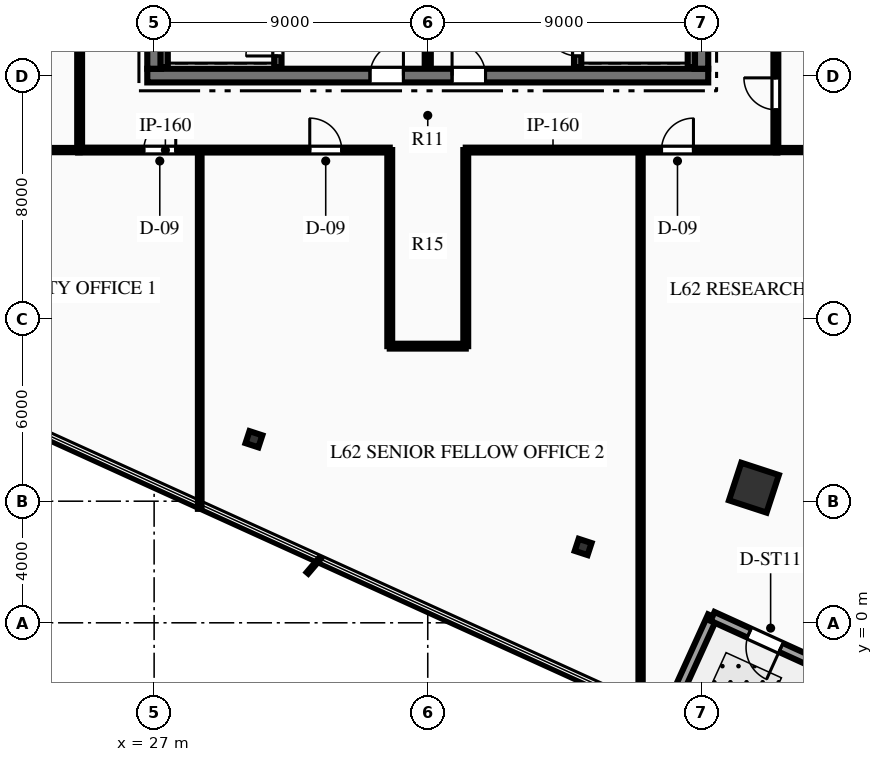
"""IFC4 building model, lengths in metres.
Left out: names, types, materials, properties, quantities, classifications, styles, units other than length and angle.
Written with IfcOpenShell. Run it as: python <this file> out.ifc"""

import sys

from ifc_helpers import new_model, si_unit, direction, frame, frame_2d, origin, origin_2d, place, context, subcontext, project, spatial, rectangle, hollow_rectangle, i_section, extrude, element, fill, save


model = new_model("IFC4")
c1 = context("Model", 3, precision=1e-05, world=origin(), true_north=direction((0.0, 1.0)))
c2 = subcontext(c1, "Body", "Model", "MODEL_VIEW")
j1 = project(units=[si_unit("LENGTHUNIT", "METRE"), si_unit("PLANEANGLEUNIT", "RADIAN")], contexts=[c1])
p1 = place(None, origin())
s1 = spatial("IfcSite", under=j1, at=p1, CompositionType="ELEMENT")
p2 = place(p1, origin())
s2 = spatial("IfcBuilding", under=s1, at=p2, CompositionType="ELEMENT")
p3 = place(p2, frame((0.0, 0.0, 248.7)))
s3 = spatial("IfcBuildingStorey", under=s2, at=p3, CompositionType="ELEMENT", Elevation=248.7)
p4 = place(p3, frame((26.775, 18.0, 0.0), z_axis=(0.0, 0.0, 1.0), x_axis=(1.0, 0.0, 0.0)))
e1 = element("IfcWall", 1, at=p4, inside=s3, PredefinedType="SHEAR", context=c2, shape_type="SweptSolid", body=[
    extrude(rectangle(XDim=18.45, YDim=0.45, at=frame_2d((9.225, 0.0))), origin(), (0.0, 0.0, 1.0), 3.75),
])
p5 = place(p4, frame((7.325, 0.0, 0.0)))
e2 = element("IfcOpeningElement", 2, at=p5, cuts=e1, PredefinedType="OPENING", context=c2, shape_type="SweptSolid", body=[
    extrude(rectangle(XDim=1.1, YDim=2.15, at=frame_2d((0.55, 1.075))), frame((0.0, 0.235, 0.0), z_axis=(0.0, -1.0, 0.0), x_axis=(1.0, 0.0, 0.0)), (0.0, 0.0, 1.0), 0.47),
])
p6 = place(p4, frame((10.025, 0.0, 0.0)))
e3 = element("IfcOpeningElement", 3, at=p6, cuts=e1, PredefinedType="OPENING", context=c2, shape_type="SweptSolid", body=[
    extrude(rectangle(XDim=1.1, YDim=2.15, at=frame_2d((0.55, 1.075))), frame((0.0, 0.235, 0.0), z_axis=(0.0, -1.0, 0.0), x_axis=(1.0, 0.0, 0.0)), (0.0, 0.0, 1.0), 0.47),
])
p7 = place(p3, frame((27.0, 18.225, 0.0), z_axis=(0.0, 0.0, 1.0), x_axis=(0.0, 1.0, 0.0)))
e4 = element("IfcWall", 4, at=p7, inside=s3, PredefinedType="SHEAR", context=c2, shape_type="SweptSolid", body=[
    extrude(rectangle(XDim=15.55, YDim=0.45, at=frame_2d((7.775, 0.0))), origin(), (0.0, 0.0, 1.0), 3.75),
])
p8 = place(p7, frame((10.015, 0.0, 0.0)))
e5 = element("IfcOpeningElement", 5, at=p8, cuts=e4, PredefinedType="OPENING", context=c2, shape_type="SweptSolid", body=[
    extrude(rectangle(XDim=1.4, YDim=2.2, at=frame_2d((0.7, 1.1))), frame((0.0, 0.235, 0.0), z_axis=(0.0, -1.0, 0.0), x_axis=(1.0, 0.0, 0.0)), (0.0, 0.0, 1.0), 0.47),
])
p9 = place(p3, frame((45.0, 18.225, 0.0), z_axis=(0.0, 0.0, 1.0), x_axis=(0.0, 1.0, 0.0)))
e6 = element("IfcWall", 6, at=p9, inside=s3, PredefinedType="SHEAR", context=c2, shape_type="SweptSolid", body=[
    extrude(rectangle(XDim=15.55, YDim=0.45, at=frame_2d((7.775, 0.0))), origin(), (0.0, 0.0, 1.0), 3.75),
])
p10 = place(p9, frame((10.015, 0.0, 0.0)))
e7 = element("IfcOpeningElement", 7, at=p10, cuts=e6, PredefinedType="OPENING", context=c2, shape_type="SweptSolid", body=[
    extrude(rectangle(XDim=1.4, YDim=2.2, at=frame_2d((0.7, 1.1))), frame((0.0, 0.235, 0.0), z_axis=(0.0, -1.0, 0.0), x_axis=(1.0, 0.0, 0.0)), (0.0, 0.0, 1.0), 0.47),
])
p11 = place(p3, frame((31.07, 18.28, 0.0), z_axis=(0.0, 0.0, 1.0), x_axis=(0.0, 1.0, 0.0)))
e8 = element("IfcWall", 8, at=p11, inside=s3, PredefinedType="SHEAR", context=c2, shape_type="SweptSolid", body=[
    extrude(rectangle(XDim=8.26, YDim=0.24, at=frame_2d((4.13, 0.0))), origin(), (0.0, 0.0, 1.0), 3.75),
])
p12 = place(p11, frame((0.365, 0.0, 0.0)))
e9 = element("IfcOpeningElement", 9, at=p12, cuts=e8, PredefinedType="OPENING", context=c2, shape_type="SweptSolid", body=[
    extrude(rectangle(XDim=1.05, YDim=2.15, at=frame_2d((0.525, 1.075))), frame((0.0, 0.13, 0.0), z_axis=(0.0, -1.0, 0.0), x_axis=(1.0, 0.0, 0.0)), (0.0, 0.0, 1.0), 0.26),
])
p13 = place(p3, frame((27.33, 18.28, 0.0), z_axis=(0.0, 0.0, 1.0), x_axis=(0.0, 1.0, 0.0)))
e10 = element("IfcWall", 10, at=p13, inside=s3, PredefinedType="SHEAR", context=c2, shape_type="SweptSolid", body=[
    extrude(rectangle(XDim=8.26, YDim=0.24, at=frame_2d((4.13, 0.0))), origin(), (0.0, 0.0, 1.0), 3.75),
])
p14 = place(p3, frame((40.93, 18.28, 0.0), z_axis=(0.0, 0.0, 1.0), x_axis=(0.0, 1.0, 0.0)))
e11 = element("IfcWall", 11, at=p14, inside=s3, PredefinedType="SHEAR", context=c2, shape_type="SweptSolid", body=[
    extrude(rectangle(XDim=8.26, YDim=0.24, at=frame_2d((4.13, 0.0))), origin(), (0.0, 0.0, 1.0), 3.75),
])
p15 = place(p14, frame((0.365, 0.0, 0.0)))
e12 = element("IfcOpeningElement", 12, at=p15, cuts=e11, PredefinedType="OPENING", context=c2, shape_type="SweptSolid", body=[
    extrude(rectangle(XDim=1.05, YDim=2.15, at=frame_2d((0.525, 1.075))), frame((0.0, 0.13, 0.0), z_axis=(0.0, -1.0, 0.0), x_axis=(1.0, 0.0, 0.0)), (0.0, 0.0, 1.0), 0.26),
])
p16 = place(p3, frame((44.67, 18.28, 0.0), z_axis=(0.0, 0.0, 1.0), x_axis=(0.0, 1.0, 0.0)))
e13 = element("IfcWall", 13, at=p16, inside=s3, PredefinedType="SHEAR", context=c2, shape_type="SweptSolid", body=[
    extrude(rectangle(XDim=8.26, YDim=0.24, at=frame_2d((4.13, 0.0))), origin(), (0.0, 0.0, 1.0), 3.75),
])
p17 = place(p3, frame((46.728, 4.445, 0.0), z_axis=(0.0, 0.0, 1.0), x_axis=(0.311008203279, 0.950407227189, 0.0)))
e14 = element("IfcColumn", 14, at=p17, inside=s3, PredefinedType="COLUMN", context=c2, shape_type="SweptSolid", body=[
    extrude(hollow_rectangle(XDim=1.3, YDim=1.3, WallThickness=0.06, at=origin_2d()), origin(), (0.0, 0.0, 1.0), 3.75),
])
for number, where, z_axis, x_axis in (
    (15, (30.283, 6.038, 0.0), (0.0, 0.0, 1.0), (0.311, 0.95, 0.0)),
    (16, (41.111, 2.495, 0.0), (0.0, 0.0, 1.0), (0.311, 0.95, 0.0)),
):
    element("IfcColumn", number, at=place(p3, frame(where, z_axis=z_axis, x_axis=x_axis)), inside=s3, PredefinedType="COLUMN", context=c2, shape_type="SweptSolid", body=[
        extrude(i_section(OverallWidth=0.416, OverallDepth=0.445, WebThickness=0.039, FlangeThickness=0.063, at=origin_2d()), origin(), (0.0, 0.0, 1.0), 3.75),
    ])
p18 = place(p3, frame((45.366, 0.211, 0.0), z_axis=(0.0, 0.0, 1.0), x_axis=(-0.41390944086, -0.910318062419, 0.0)))
e17 = element("IfcWall", 17, at=p18, inside=s3, PredefinedType="STANDARD", context=c2, shape_type="SweptSolid", body=[
    extrude(rectangle(XDim=3.8, YDim=0.32, at=frame_2d((1.9, 0.0))), origin(), (0.0, 0.0, 1.0), 3.48),
])
p19 = place(p3, frame((48.825, -1.362, 0.0), z_axis=(0.0, 0.0, 1.0), x_axis=(-0.910329069121, 0.413885232781, 0.0)))
e18 = element("IfcWall", 18, at=p19, inside=s3, PredefinedType="STANDARD", context=c2, shape_type="SweptSolid", body=[
    extrude(rectangle(XDim=3.8, YDim=0.32, at=frame_2d((1.9, 0.0))), origin(), (0.0, 0.0, 1.0), 3.48),
])
p20 = place(p19, frame((1.325, 0.0, 0.0)))
e19 = element("IfcOpeningElement", 19, at=p20, cuts=e18, PredefinedType="OPENING", context=c2, shape_type="SweptSolid", body=[
    extrude(rectangle(XDim=1.15, YDim=2.2, at=frame_2d((0.575, 1.1))), frame((0.0, 0.17, 0.0), z_axis=(0.0, -1.0, 0.0), x_axis=(1.0, 0.0, 0.0)), (0.0, 0.0, 1.0), 0.34),
])
p21 = place(p3, frame((36.0, 18.28, 0.0), z_axis=(0.0, 0.0, 1.0), x_axis=(0.0, 1.0, 0.0)))
e20 = element("IfcWall", 20, at=p21, inside=s3, PredefinedType="PARTITIONING", context=c2, shape_type="SweptSolid", body=[
    extrude(rectangle(XDim=3.77, YDim=0.2, at=frame_2d((1.885, 0.0))), origin(), (0.0, 0.0, 1.0), 3.48),
])
p22 = place(p3, frame((24.5, 15.55, 0.0), z_axis=(0.0, 0.0, 1.0), x_axis=(1.0, 0.0, 0.0)))
e21 = element("IfcWall", 21, at=p22, inside=s3, PredefinedType="PARTITIONING", context=c2, shape_type="SweptSolid", body=[
    extrude(rectangle(XDim=10.25, YDim=0.16, at=frame_2d((5.125, 0.0))), origin(), (0.0, 0.0, 1.0), 3.48),
])
p23 = place(p22, frame((2.161, 0.0, 0.0)))
e22 = element("IfcOpeningElement", 22, at=p23, cuts=e21, PredefinedType="OPENING", context=c2, shape_type="SweptSolid", body=[
    extrude(rectangle(XDim=1.05, YDim=2.15, at=frame_2d((0.525, 1.075))), frame((0.0, 0.09, 0.0), z_axis=(0.0, -1.0, 0.0), x_axis=(1.0, 0.0, 0.0)), (0.0, 0.0, 1.0), 0.18),
])
p24 = place(p22, frame((7.619, 0.0, 0.0)))
e23 = element("IfcOpeningElement", 23, at=p24, cuts=e21, PredefinedType="OPENING", context=c2, shape_type="SweptSolid", body=[
    extrude(rectangle(XDim=1.05, YDim=2.15, at=frame_2d((0.525, 1.075))), frame((0.0, 0.09, 0.0), z_axis=(0.0, -1.0, 0.0), x_axis=(1.0, 0.0, 0.0)), (0.0, 0.0, 1.0), 0.18),
])
p25 = place(p3, frame((37.25, 15.55, 0.0), z_axis=(0.0, 0.0, 1.0), x_axis=(1.0, 0.0, 0.0)))
e24 = element("IfcWall", 24, at=p25, inside=s3, PredefinedType="PARTITIONING", context=c2, shape_type="SweptSolid", body=[
    extrude(rectangle(XDim=10.25, YDim=0.16, at=frame_2d((5.125, 0.0))), origin(), (0.0, 0.0, 1.0), 3.48),
])
p26 = place(p25, frame((6.439, 0.0, 0.0)))
e25 = element("IfcOpeningElement", 25, at=p26, cuts=e24, PredefinedType="OPENING", context=c2, shape_type="SweptSolid", body=[
    extrude(rectangle(XDim=1.05, YDim=2.15, at=frame_2d((0.525, 1.075))), frame((0.0, 0.09, 0.0), z_axis=(0.0, -1.0, 0.0), x_axis=(1.0, 0.0, 0.0)), (0.0, 0.0, 1.0), 0.18),
])
p27 = place(p3, frame((24.55, 15.55, 0.0), z_axis=(0.0, 0.0, 1.0), x_axis=(0.0, 1.0, 0.0)))
e26 = element("IfcWall", 26, at=p27, inside=s3, PredefinedType="PARTITIONING", context=c2, shape_type="SweptSolid", body=[
    extrude(rectangle(XDim=9.2, YDim=0.16, at=frame_2d((4.6, 0.0))), origin(), (0.0, 0.0, 1.0), 3.48),
])
p28 = place(p27, frame((3.407, 0.0, 0.0)))
e27 = element("IfcOpeningElement", 27, at=p28, cuts=e26, PredefinedType="OPENING", context=c2, shape_type="SweptSolid", body=[
    extrude(rectangle(XDim=1.05, YDim=2.15, at=frame_2d((0.525, 1.075))), frame((0.0, 0.09, 0.0), z_axis=(0.0, -1.0, 0.0), x_axis=(1.0, 0.0, 0.0)), (0.0, 0.0, 1.0), 0.18),
])
p29 = place(p3, frame((47.45, 15.55, 0.0), z_axis=(0.0, 0.0, 1.0), x_axis=(0.0, 1.0, 0.0)))
e28 = element("IfcWall", 28, at=p29, inside=s3, PredefinedType="PARTITIONING", context=c2, shape_type="SweptSolid", body=[
    extrude(rectangle(XDim=9.2, YDim=0.16, at=frame_2d((4.6, 0.0))), origin(), (0.0, 0.0, 1.0), 3.48),
])
p30 = place(p29, frame((1.325, 0.0, 0.0)))
e29 = element("IfcOpeningElement", 29, at=p30, cuts=e28, PredefinedType="OPENING", context=c2, shape_type="SweptSolid", body=[
    extrude(rectangle(XDim=1.05, YDim=2.15, at=frame_2d((0.525, 1.075))), frame((0.0, 0.09, 0.0), z_axis=(0.0, -1.0, 0.0), x_axis=(1.0, 0.0, 0.0)), (0.0, 0.0, 1.0), 0.18),
])
for number, where, z_axis, x_axis in (
    (30, (34.75, 9.1, 0.0), (0.0, 0.0, 1.0), (0.0, 1.0, 0.0)),
    (31, (37.25, 9.1, 0.0), (0.0, 0.0, 1.0), (0.0, 1.0, 0.0)),
):
    element("IfcWall", number, at=place(p3, frame(where, z_axis=z_axis, x_axis=x_axis)), inside=s3, PredefinedType="PARTITIONING", context=c2, shape_type="SweptSolid", body=[
        extrude(rectangle(XDim=6.45, YDim=0.16, at=frame_2d((3.225, 0.0))), origin(), (0.0, 0.0, 1.0), 3.48),
    ])
p31 = place(p3, frame((34.75, 9.1, 0.0), z_axis=(0.0, 0.0, 1.0), x_axis=(1.0, 0.0, 0.0)))
e32 = element("IfcWall", 32, at=p31, inside=s3, PredefinedType="PARTITIONING", context=c2, shape_type="SweptSolid", body=[
    extrude(rectangle(XDim=2.5, YDim=0.16, at=frame_2d((1.25, 0.0))), origin(), (0.0, 0.0, 1.0), 3.48),
])
p32 = place(p3, frame((11.715, 15.55, 0.0), z_axis=(0.0, 0.0, 1.0), x_axis=(1.0, 0.0, 0.0)))
e33 = element("IfcWall", 33, at=p32, inside=s3, PredefinedType="PARTITIONING", context=c2, shape_type="SweptSolid", body=[
    extrude(rectangle(XDim=12.835, YDim=0.14, at=frame_2d((6.417, 0.0))), origin(), (0.0, 0.0, 1.0), 2.858),
])
p33 = place(p3, frame((47.45, 15.55, 0.0), z_axis=(0.0, 0.0, 1.0), x_axis=(1.0, 0.0, 0.0)))
e34 = element("IfcWall", 34, at=p33, inside=s3, PredefinedType="PARTITIONING", context=c2, shape_type="SweptSolid", body=[
    extrude(rectangle(XDim=9.021, YDim=0.14, at=frame_2d((4.51, 0.0))), origin(), (0.0, 0.0, 1.0), 3.48),
])
p34 = place(p3, frame((28.5, 3.749, 0.0), z_axis=(0.0, 0.0, 1.0), x_axis=(0.0, 1.0, 0.0)))
e35 = element("IfcWall", 35, at=p34, inside=s3, PredefinedType="PARTITIONING", context=c2, shape_type="SweptSolid", body=[
    extrude(rectangle(XDim=11.801, YDim=0.12, at=frame_2d((5.901, 0.0))), origin(), (0.0, 0.0, 1.0), 3.48),
])
p35 = place(p3, frame((43.0, -2.844, 0.0), z_axis=(0.0, 0.0, 1.0), x_axis=(0.0, 1.0, 0.0)))
e36 = element("IfcWall", 36, at=p35, inside=s3, PredefinedType="PARTITIONING", context=c2, shape_type="SweptSolid", body=[
    extrude(rectangle(XDim=18.394, YDim=0.14, at=frame_2d((9.197, 0.0))), origin(), (0.0, 0.0, 1.0), 3.48),
])
p36 = place(p20, origin())
e37 = element("IfcDoor", 37, at=p36, inside=s3, OperationType="SINGLE_SWING_LEFT", PredefinedType="DOOR", context=c2, shape_type="SweptSolid", body=[
    extrude(rectangle(XDim=1.15, YDim=2.2, at=frame_2d((0.575, 1.1))), frame((0.0, 0.025, 0.0), z_axis=(0.0, -1.0, 0.0), x_axis=(1.0, 0.0, 0.0)), (0.0, 0.0, 1.0), 0.05),
])
fill(e19, e37)
p37 = place(p12, origin())
e38 = element("IfcDoor", 38, at=p37, inside=s3, OperationType="SINGLE_SWING_LEFT", PredefinedType="DOOR", context=c2, shape_type="SweptSolid", body=[
    extrude(rectangle(XDim=1.05, YDim=2.15, at=frame_2d((0.525, 1.075))), frame((0.0, 0.025, 0.0), z_axis=(0.0, -1.0, 0.0), x_axis=(1.0, 0.0, 0.0)), (0.0, 0.0, 1.0), 0.05),
])
fill(e9, e38)
p38 = place(p15, origin())
e39 = element("IfcDoor", 39, at=p38, inside=s3, OperationType="SINGLE_SWING_RIGHT", PredefinedType="DOOR", context=c2, shape_type="SweptSolid", body=[
    extrude(rectangle(XDim=1.05, YDim=2.15, at=frame_2d((0.525, 1.075))), frame((0.0, 0.025, 0.0), z_axis=(0.0, -1.0, 0.0), x_axis=(1.0, 0.0, 0.0)), (0.0, 0.0, 1.0), 0.05),
])
fill(e12, e39)
p39 = place(p5, origin())
e40 = element("IfcDoor", 40, at=p39, inside=s3, OperationType="SINGLE_SWING_RIGHT", PredefinedType="DOOR", context=c2, shape_type="SweptSolid", body=[
    extrude(rectangle(XDim=1.1, YDim=2.15, at=frame_2d((0.55, 1.075))), frame((0.0, 0.025, 0.0), z_axis=(0.0, -1.0, 0.0), x_axis=(1.0, 0.0, 0.0)), (0.0, 0.0, 1.0), 0.05),
])
fill(e2, e40)
p40 = place(p6, origin())
e41 = element("IfcDoor", 41, at=p40, inside=s3, OperationType="SINGLE_SWING_LEFT", PredefinedType="DOOR", context=c2, shape_type="SweptSolid", body=[
    extrude(rectangle(XDim=1.1, YDim=2.15, at=frame_2d((0.55, 1.075))), frame((0.0, 0.025, 0.0), z_axis=(0.0, -1.0, 0.0), x_axis=(1.0, 0.0, 0.0)), (0.0, 0.0, 1.0), 0.05),
])
fill(e3, e41)
p41 = place(p23, origin())
e42 = element("IfcDoor", 42, at=p41, inside=s3, OperationType="SINGLE_SWING_RIGHT", PredefinedType="DOOR", context=c2, shape_type="SweptSolid", body=[
    extrude(rectangle(XDim=1.05, YDim=2.15, at=frame_2d((0.525, 1.075))), frame((0.0, 0.025, 0.0), z_axis=(0.0, -1.0, 0.0), x_axis=(1.0, 0.0, 0.0)), (0.0, 0.0, 1.0), 0.05),
])
fill(e22, e42)
p42 = place(p24, origin())
e43 = element("IfcDoor", 43, at=p42, inside=s3, OperationType="SINGLE_SWING_LEFT", PredefinedType="DOOR", context=c2, shape_type="SweptSolid", body=[
    extrude(rectangle(XDim=1.05, YDim=2.15, at=frame_2d((0.525, 1.075))), frame((0.0, 0.025, 0.0), z_axis=(0.0, -1.0, 0.0), x_axis=(1.0, 0.0, 0.0)), (0.0, 0.0, 1.0), 0.05),
])
fill(e23, e43)
p43 = place(p26, origin())
e44 = element("IfcDoor", 44, at=p43, inside=s3, OperationType="SINGLE_SWING_RIGHT", PredefinedType="DOOR", context=c2, shape_type="SweptSolid", body=[
    extrude(rectangle(XDim=1.05, YDim=2.15, at=frame_2d((0.525, 1.075))), frame((0.0, 0.025, 0.0), z_axis=(0.0, -1.0, 0.0), x_axis=(1.0, 0.0, 0.0)), (0.0, 0.0, 1.0), 0.05),
])
fill(e25, e44)
p44 = place(p30, origin())
e45 = element("IfcDoor", 45, at=p44, inside=s3, OperationType="SINGLE_SWING_RIGHT", PredefinedType="DOOR", context=c2, shape_type="SweptSolid", body=[
    extrude(rectangle(XDim=1.05, YDim=2.15, at=frame_2d((0.525, 1.075))), frame((0.0, 0.025, 0.0), z_axis=(0.0, -1.0, 0.0), x_axis=(1.0, 0.0, 0.0)), (0.0, 0.0, 1.0), 0.05),
])
fill(e29, e45)
save(model, sys.argv[1])
